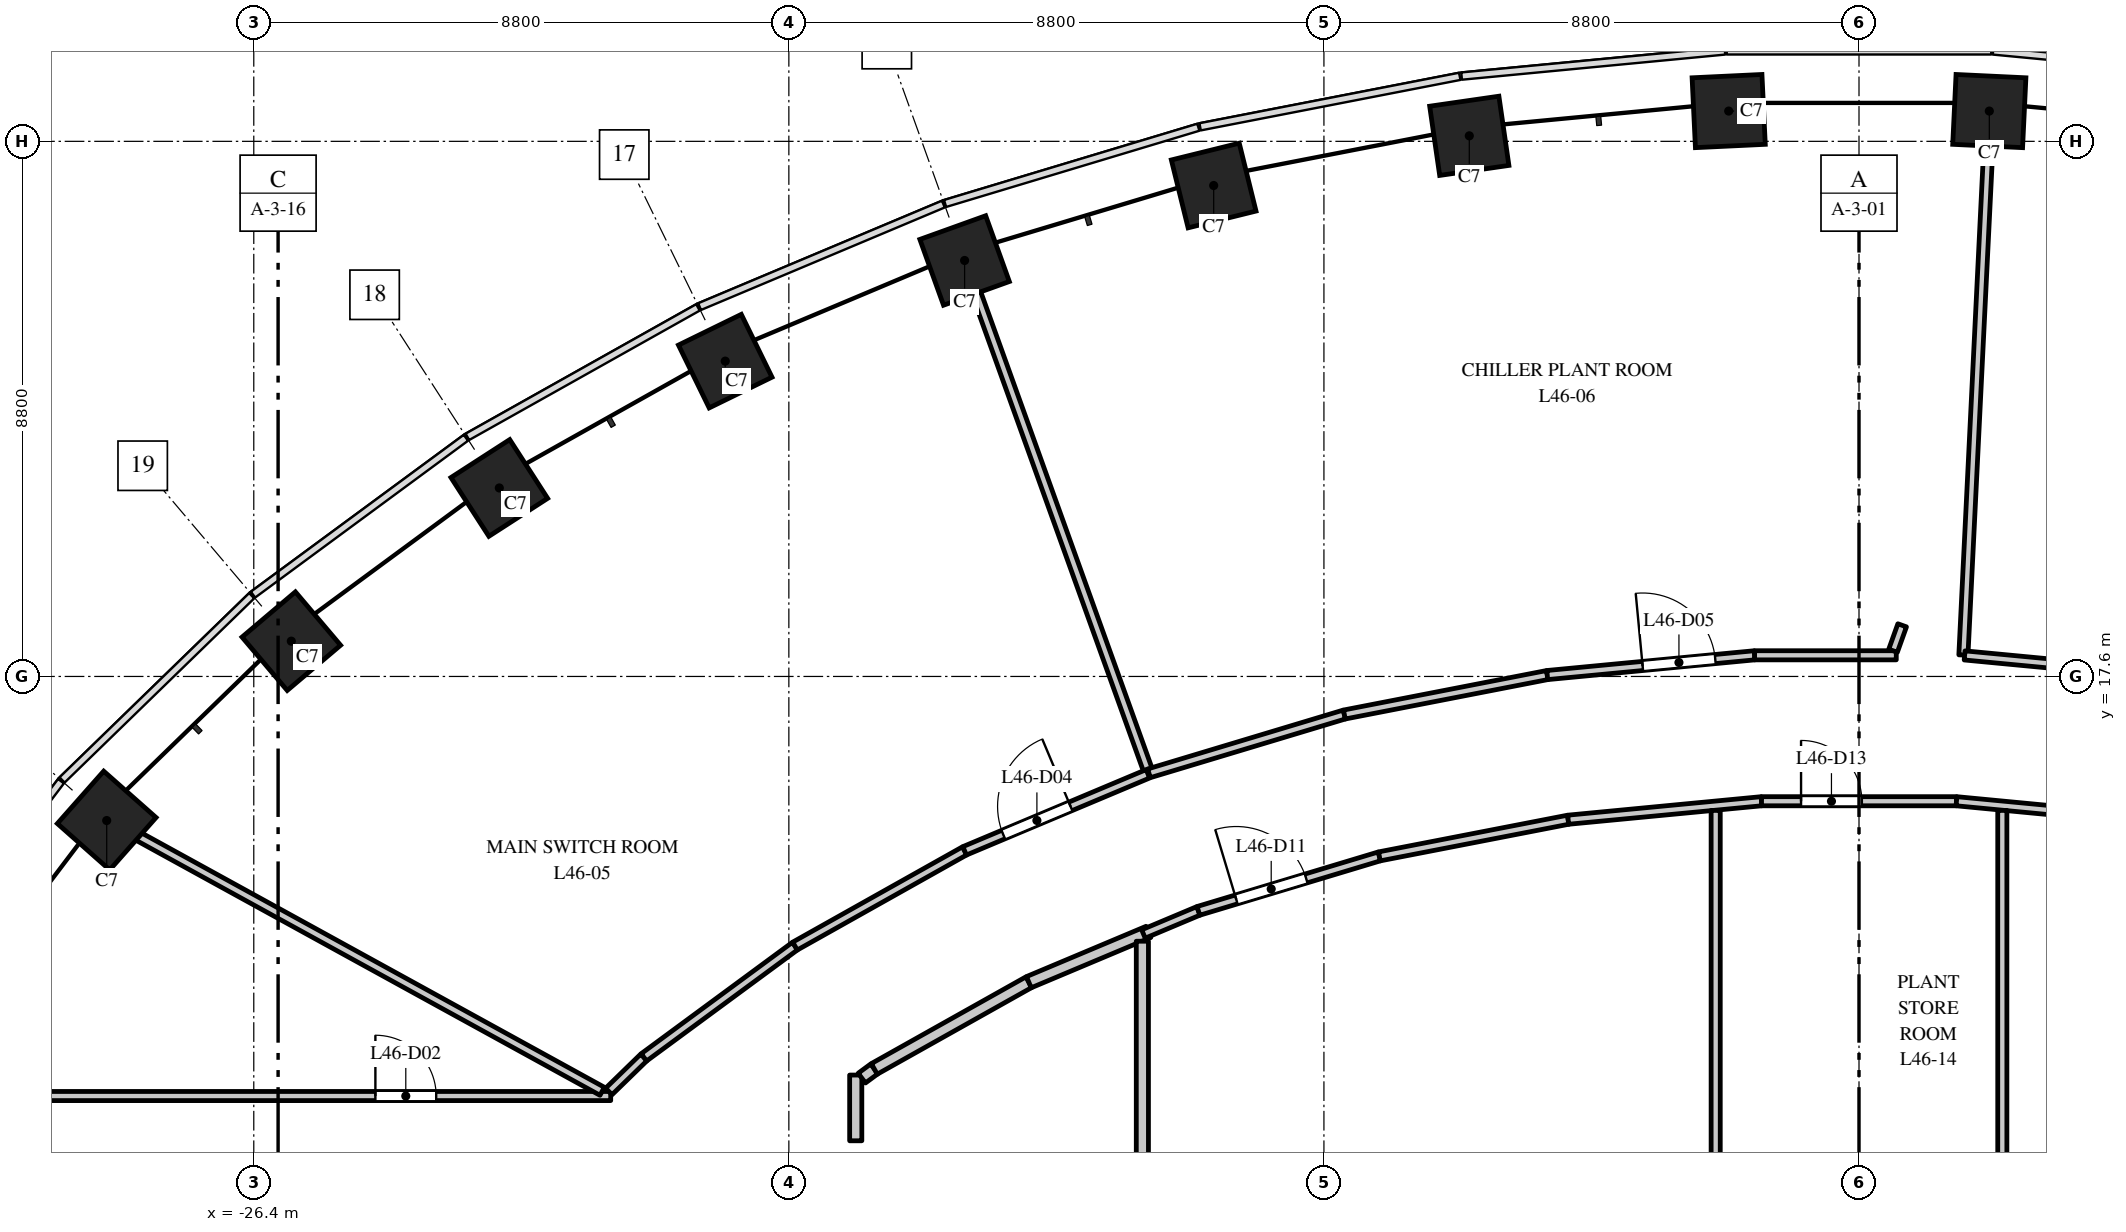
"""IFC4 building model, lengths in metres.
Left out: names, types, materials, properties, quantities, classifications, styles, units other than length and angle.
Written with IfcOpenShell. Run it as: python <this file> out.ifc"""

import sys

from ifc_helpers import new_model, si_unit, direction, frame, frame_2d, origin, origin_2d, place, context, subcontext, project, spatial, rectangle, extrude, element, fill, save


model = new_model("IFC4")
c1 = context("Model", 3, precision=1e-05, world=origin(), true_north=direction((0.0, 1.0)))
c2 = subcontext(c1, "Body", "Model", "MODEL_VIEW")
j1 = project(units=[si_unit("LENGTHUNIT", "METRE"), si_unit("PLANEANGLEUNIT", "RADIAN")], contexts=[c1])
p1 = place(None, origin())
s1 = spatial("IfcSite", under=j1, at=p1, CompositionType="ELEMENT")
p2 = place(p1, origin())
s2 = spatial("IfcBuilding", under=s1, at=p2, CompositionType="ELEMENT")
p3 = place(p2, frame((0.0, 0.0, 198.0)))
s3 = spatial("IfcBuildingStorey", under=s2, at=p3, CompositionType="ELEMENT", Elevation=198.0)
for number, where, z_axis, x_axis in (
    (1, (2.143, 26.898, 0.0), (0.0, 0.0, 1.0), (-0.999, 0.048, 0.0)),
    (2, (-2.143, 26.898, 0.0), (0.0, 0.0, 1.0), (-0.999, -0.048, 0.0)),
    (3, (-6.409, 26.491, 0.0), (0.0, 0.0, 1.0), (-0.99, -0.143, 0.0)),
    (4, (-10.613, 25.674, 0.0), (0.0, 0.0, 1.0), (-0.971, -0.24, 0.0)),
    (5, (-14.709, 24.441, 0.0), (0.0, 0.0, 1.0), (-0.941, -0.338, 0.0)),
    (6, (-18.646, 22.785, 0.0), (0.0, 0.0, 1.0), (-0.898, -0.439, 0.0)),
    (7, (-22.362, 20.7, 0.0), (0.0, 0.0, 1.0), (-0.84, -0.542, 0.0)),
    (8, (-25.783, 18.18, 0.0), (0.0, 0.0, 1.0), (-0.763, -0.646, 0.0)),
    (9, (-28.819, 15.23, 0.0), (0.0, 0.0, 1.0), (-0.663, -0.749, 0.0)),
):
    element("IfcColumn", number, at=place(p3, frame(where, z_axis=z_axis, x_axis=x_axis)), inside=s3, PredefinedType="COLUMN", context=c2, shape_type="SweptSolid", body=[
        extrude(rectangle(XDim=1.15, YDim=1.15, at=origin_2d()), origin(), (0.0, 0.0, 1.0), 5.5),
    ])
p4 = place(p3, frame((-30.397, 10.7, 0.0), z_axis=(0.0, 0.0, 1.0), x_axis=(1.0, 0.0, 0.0)))
e10 = element("IfcWall", 10, at=p4, inside=s3, PredefinedType="PARTITIONING", context=c2, shape_type="SweptSolid", body=[
    extrude(rectangle(XDim=9.867, YDim=0.15, at=frame_2d((4.934, 0.0))), origin(), (0.0, 0.0, 1.0), 4.35),
])
p5 = place(p4, frame((5.997, 0.0, 0.0)))
e11 = element("IfcOpeningElement", 11, at=p5, cuts=e10, PredefinedType="OPENING", context=c2, shape_type="SweptSolid", body=[
    extrude(rectangle(XDim=1.0, YDim=2.1, at=frame_2d((0.5, 1.05))), frame((0.0, 0.085, 0.0), z_axis=(0.0, -1.0, 0.0), x_axis=(1.0, 0.0, 0.0)), (0.0, 0.0, 1.0), 0.17),
])
p6 = place(p3, frame((-28.893, 15.297, 0.0), z_axis=(0.0, 0.0, 1.0), x_axis=(0.876381760949, -0.481617077227, 0.0)))
e12 = element("IfcWall", 12, at=p6, inside=s3, PredefinedType="PARTITIONING", context=c2, shape_type="SweptSolid", body=[
    extrude(rectangle(XDim=9.383, YDim=0.15, at=frame_2d((4.691, 0.0))), origin(), (0.0, 0.0, 1.0), 5.15),
])
p7 = place(p3, frame((-20.561, 10.775, 0.0), z_axis=(0.0, 0.0, 1.0), x_axis=(0.717045449997, 0.697026414591, 0.0)))
e13 = element("IfcWall", 13, at=p7, inside=s3, PredefinedType="PARTITIONING", context=c2, shape_type="SweptSolid", body=[
    extrude(rectangle(XDim=0.805, YDim=0.15, at=frame_2d((0.402, 0.0))), origin(), (0.0, 0.0, 1.0), 5.15),
])
p8 = place(p3, frame((-19.984, 11.336, 0.0), z_axis=(0.0, 0.0, 1.0), x_axis=(0.805191029373, 0.593015519373, 0.0)))
e14 = element("IfcWall", 14, at=p8, inside=s3, PredefinedType="PARTITIONING", context=c2, shape_type="SweptSolid", body=[
    extrude(rectangle(XDim=3.086, YDim=0.15, at=frame_2d((1.543, 0.0))), origin(), (0.0, 0.0, 1.0), 4.2),
])
p9 = place(p3, frame((-17.499, 13.166, 0.0), z_axis=(0.0, 0.0, 1.0), x_axis=(0.872039782413, 0.489434998635, 0.0)))
e15 = element("IfcWall", 15, at=p9, inside=s3, PredefinedType="PARTITIONING", context=c2, shape_type="SweptSolid", body=[
    extrude(rectangle(XDim=3.199, YDim=0.15, at=frame_2d((1.6, 0.0))), origin(), (0.0, 0.0, 1.0), 5.15),
])
p10 = place(p3, frame((-16.5, 9.964, 0.0), z_axis=(0.0, 0.0, 1.0), x_axis=(0.0, 1.0, 0.0)))
e16 = element("IfcWall", 16, at=p10, inside=s3, PredefinedType="PARTITIONING", context=c2, shape_type="SweptSolid", body=[
    extrude(rectangle(XDim=1.081, YDim=0.2, at=frame_2d((0.541, 0.0))), origin(), (0.0, 0.0, 1.0), 5.15),
])
p11 = place(p3, frame((-16.4, 10.995, 0.0), z_axis=(0.0, 0.0, 1.0), x_axis=(0.805152309286, 0.593068089558, 0.0)))
e17 = element("IfcWall", 17, at=p11, inside=s3, PredefinedType="PARTITIONING", context=c2, shape_type="SweptSolid", body=[
    extrude(rectangle(XDim=0.254, YDim=0.2, at=frame_2d((0.127, 0.0))), origin(), (0.0, 0.0, 1.0), 5.15),
])
p12 = place(p3, frame((-16.195, 11.146, 0.0), z_axis=(0.0, 0.0, 1.0), x_axis=(0.872138682379, 0.48925874412, 0.0)))
e18 = element("IfcWall", 18, at=p12, inside=s3, PredefinedType="PARTITIONING", context=c2, shape_type="SweptSolid", body=[
    extrude(rectangle(XDim=2.915, YDim=0.2, at=frame_2d((1.457, 0.0))), origin(), (0.0, 0.0, 1.0), 4.2),
])
p13 = place(p3, frame((-14.743, 24.535, 0.0), z_axis=(0.0, 0.0, 1.0), x_axis=(0.338360587152, -0.941016531769, 0.0)))
e19 = element("IfcWall", 19, at=p13, inside=s3, PredefinedType="PARTITIONING", context=c2, shape_type="SweptSolid", body=[
    extrude(rectangle(XDim=9.058, YDim=0.15, at=frame_2d((4.529, 0.0))), origin(), (0.0, 0.0, 1.0), 5.15),
])
p14 = place(p3, frame((-14.709, 14.732, 0.0), z_axis=(0.0, 0.0, 1.0), x_axis=(0.921846082319, 0.387556190137, 0.0)))
e20 = element("IfcWall", 20, at=p14, inside=s3, PredefinedType="PARTITIONING", context=c2, shape_type="SweptSolid", body=[
    extrude(rectangle(XDim=3.27, YDim=0.15, at=frame_2d((1.635, 0.0))), origin(), (0.0, 0.0, 1.0), 4.3),
])
p15 = place(p14, frame((0.689, 0.0, 0.0)))
e21 = element("IfcOpeningElement", 21, at=p15, cuts=e20, PredefinedType="OPENING", context=c2, shape_type="SweptSolid", body=[
    extrude(rectangle(XDim=1.2, YDim=2.1, at=frame_2d((0.6, 1.05))), frame((0.0, 0.085, 0.0), z_axis=(0.0, -1.0, 0.0), x_axis=(1.0, 0.0, 0.0)), (0.0, 0.0, 1.0), 0.17),
])
p16 = place(p3, frame((-13.653, 12.572, 0.0), z_axis=(0.0, 0.0, 1.0), x_axis=(0.921857058749, 0.387530080425, 0.0)))
e22 = element("IfcWall", 22, at=p16, inside=s3, PredefinedType="PARTITIONING", context=c2, shape_type="SweptSolid", body=[
    extrude(rectangle(XDim=2.134, YDim=0.2, at=frame_2d((1.067, 0.0))), origin(), (0.0, 0.0, 1.0), 5.15),
])
p17 = place(p3, frame((-11.786, -13.246, 0.0), z_axis=(0.0, 0.0, 1.0), x_axis=(0.0, 1.0, 0.0)))
e23 = element("IfcWall", 23, at=p17, inside=s3, PredefinedType="PARTITIONING", context=c2, shape_type="SweptSolid", body=[
    extrude(rectangle(XDim=26.492, YDim=0.2, at=frame_2d((13.246, 0.0))), origin(), (0.0, 0.0, 1.0), 4.2),
])
p18 = place(p3, frame((-11.768, 13.365, 0.0), z_axis=(0.0, 0.0, 1.0), x_axis=(0.921827385825, 0.387600658852, 0.0)))
e24 = element("IfcWall", 24, at=p18, inside=s3, PredefinedType="PARTITIONING", context=c2, shape_type="SweptSolid", body=[
    extrude(rectangle(XDim=0.981, YDim=0.15, at=frame_2d((0.49, 0.0))), origin(), (0.0, 0.0, 1.0), 4.3),
])
p19 = place(p3, frame((-11.677, 16.007, 0.0), z_axis=(0.0, 0.0, 1.0), x_axis=(0.957565546192, 0.28821558727, 0.0)))
e25 = element("IfcWall", 25, at=p19, inside=s3, PredefinedType="PARTITIONING", context=c2, shape_type="SweptSolid", body=[
    extrude(rectangle(XDim=3.355, YDim=0.15, at=frame_2d((1.678, 0.0))), origin(), (0.0, 0.0, 1.0), 5.15),
])
p20 = place(p3, frame((-10.864, 13.745, 0.0), z_axis=(0.0, 0.0, 1.0), x_axis=(0.957544770641, 0.28828460281, 0.0)))
e26 = element("IfcWall", 26, at=p20, inside=s3, PredefinedType="PARTITIONING", context=c2, shape_type="SweptSolid", body=[
    extrude(rectangle(XDim=3.108, YDim=0.15, at=frame_2d((1.554, 0.0))), origin(), (0.0, 0.0, 1.0), 5.15),
])
p21 = place(p20, frame((0.65, 0.0, 0.0)))
e27 = element("IfcOpeningElement", 27, at=p21, cuts=e26, PredefinedType="OPENING", context=c2, shape_type="SweptSolid", body=[
    extrude(rectangle(XDim=1.2, YDim=2.1, at=frame_2d((0.6, 1.05))), frame((0.0, 0.085, 0.0), z_axis=(0.0, -1.0, 0.0), x_axis=(1.0, 0.0, 0.0)), (0.0, 0.0, 1.0), 0.17),
])
p22 = place(p3, frame((-8.464, 16.974, 0.0), z_axis=(0.0, 0.0, 1.0), x_axis=(0.981613520879, 0.190879269771, 0.0)))
e28 = element("IfcWall", 28, at=p22, inside=s3, PredefinedType="PARTITIONING", context=c2, shape_type="SweptSolid", body=[
    extrude(rectangle(XDim=3.4, YDim=0.15, at=frame_2d((1.7, 0.0))), origin(), (0.0, 0.0, 1.0), 4.3),
])
p23 = place(p3, frame((-7.888, 14.641, 0.0), z_axis=(0.0, 0.0, 1.0), x_axis=(0.981672390077, 0.190576280162, 0.0)))
e29 = element("IfcWall", 29, at=p23, inside=s3, PredefinedType="PARTITIONING", context=c2, shape_type="SweptSolid", body=[
    extrude(rectangle(XDim=3.163, YDim=0.15, at=frame_2d((1.582, 0.0))), origin(), (0.0, 0.0, 1.0), 4.3),
])
p24 = place(p3, frame((-5.127, 17.623, 0.0), z_axis=(0.0, 0.0, 1.0), x_axis=(0.995490025265, 0.094866272186, 0.0)))
e30 = element("IfcWall", 30, at=p24, inside=s3, PredefinedType="PARTITIONING", context=c2, shape_type="SweptSolid", body=[
    extrude(rectangle(XDim=3.425, YDim=0.15, at=frame_2d((1.713, 0.0))), origin(), (0.0, 0.0, 1.0), 5.15),
])
p25 = place(p24, frame((1.575, 0.0, 0.0)))
e31 = element("IfcOpeningElement", 31, at=p25, cuts=e30, PredefinedType="OPENING", context=c2, shape_type="SweptSolid", body=[
    extrude(rectangle(XDim=1.2, YDim=2.1, at=frame_2d((0.6, 1.05))), frame((0.0, 0.085, 0.0), z_axis=(0.0, -1.0, 0.0), x_axis=(1.0, 0.0, 0.0)), (0.0, 0.0, 1.0), 0.17),
])
p26 = place(p3, frame((-4.783, 15.244, 0.0), z_axis=(0.0, 0.0, 1.0), x_axis=(0.995455539839, 0.095227455097, 0.0)))
e32 = element("IfcWall", 32, at=p26, inside=s3, PredefinedType="PARTITIONING", context=c2, shape_type="SweptSolid", body=[
    extrude(rectangle(XDim=3.194, YDim=0.15, at=frame_2d((1.597, 0.0))), origin(), (0.0, 0.0, 1.0), 5.15),
])
p27 = place(p3, frame((-2.357, 7.21, 0.0), z_axis=(0.0, 0.0, 1.0), x_axis=(0.0, 1.0, 0.0)))
e33 = element("IfcWall", 33, at=p27, inside=s3, PredefinedType="PARTITIONING", context=c2, shape_type="SweptSolid", body=[
    extrude(rectangle(XDim=8.187, YDim=0.15, at=frame_2d((4.094, 0.0))), origin(), (0.0, 0.0, 1.0), 4.35),
])
p28 = place(p3, frame((-1.717, 17.948, 0.0), z_axis=(0.0, 0.0, 1.0), x_axis=(1.0, 0.0, 0.0)))
e34 = element("IfcWall", 34, at=p28, inside=s3, PredefinedType="PARTITIONING", context=c2, shape_type="SweptSolid", body=[
    extrude(rectangle(XDim=2.33, YDim=0.15, at=frame_2d((1.165, 0.0))), origin(), (0.0, 0.0, 1.0), 4.3),
])
p29 = place(p3, frame((-1.603, 15.548, 0.0), z_axis=(0.0, 0.0, 1.0), x_axis=(1.0, 0.0, 0.0)))
e35 = element("IfcWall", 35, at=p29, inside=s3, PredefinedType="PARTITIONING", context=c2, shape_type="SweptSolid", body=[
    extrude(rectangle(XDim=3.206, YDim=0.15, at=frame_2d((1.603, 0.0))), origin(), (0.0, 0.0, 1.0), 4.3),
])
p30 = place(p29, frame((0.65, 0.0, 0.0)))
e36 = element("IfcOpeningElement", 36, at=p30, cuts=e35, PredefinedType="OPENING", context=c2, shape_type="SweptSolid", body=[
    extrude(rectangle(XDim=1.0, YDim=2.1, at=frame_2d((0.5, 1.05))), frame((0.0, 0.085, 0.0), z_axis=(0.0, -1.0, 0.0), x_axis=(1.0, 0.0, 0.0)), (0.0, 0.0, 1.0), 0.17),
])
p31 = place(p3, frame((0.56, 18.023, 0.0), z_axis=(0.0, 0.0, 1.0), x_axis=(0.337589988908, 0.941293258974, 0.0)))
e37 = element("IfcWall", 37, at=p31, inside=s3, PredefinedType="PARTITIONING", context=c2, shape_type="SweptSolid", body=[
    extrude(rectangle(XDim=0.444, YDim=0.15, at=frame_2d((0.222, 0.0))), origin(), (0.0, 0.0, 1.0), 5.15),
])
p32 = place(p3, frame((1.603, 15.548, 0.0), z_axis=(0.0, 0.0, 1.0), x_axis=(0.995455539839, -0.095227455097, 0.0)))
e38 = element("IfcWall", 38, at=p32, inside=s3, PredefinedType="PARTITIONING", context=c2, shape_type="SweptSolid", body=[
    extrude(rectangle(XDim=3.194, YDim=0.15, at=frame_2d((1.597, 0.0))), origin(), (0.0, 0.0, 1.0), 4.3),
])
p33 = place(p3, frame((1.717, 17.952, 0.0), z_axis=(0.0, 0.0, 1.0), x_axis=(0.049011179308, 0.998798230026, 0.0)))
e39 = element("IfcWall", 39, at=p33, inside=s3, PredefinedType="PARTITIONING", context=c2, shape_type="SweptSolid", body=[
    extrude(rectangle(XDim=9.056, YDim=0.15, at=frame_2d((4.528, 0.0))), origin(), (0.0, 0.0, 1.0), 5.15),
])
p34 = place(p3, frame((1.737, 17.946, 0.0), z_axis=(0.0, 0.0, 1.0), x_axis=(0.995491282675, -0.094853076484, 0.0)))
e40 = element("IfcWall", 40, at=p34, inside=s3, PredefinedType="PARTITIONING", context=c2, shape_type="SweptSolid", body=[
    extrude(rectangle(XDim=3.405, YDim=0.15, at=frame_2d((1.703, 0.0))), origin(), (0.0, 0.0, 1.0), 4.3),
])
p35 = place(p3, frame((2.357, 7.21, 0.0), z_axis=(0.0, 0.0, 1.0), x_axis=(0.0, 1.0, 0.0)))
e41 = element("IfcWall", 41, at=p35, inside=s3, PredefinedType="PARTITIONING", context=c2, shape_type="SweptSolid", body=[
    extrude(rectangle(XDim=8.187, YDim=0.15, at=frame_2d((4.094, 0.0))), origin(), (0.0, 0.0, 1.0), 4.3),
])
p36 = place(p5, origin())
e42 = element("IfcDoor", 42, at=p36, inside=s3, OperationType="SINGLE_SWING_LEFT", PredefinedType="DOOR", context=c2, shape_type="SweptSolid", body=[
    extrude(rectangle(XDim=1.0, YDim=2.1, at=frame_2d((0.5, 1.05))), frame((0.0, 0.025, 0.0), z_axis=(0.0, -1.0, 0.0), x_axis=(1.0, 0.0, 0.0)), (0.0, 0.0, 1.0), 0.05),
])
fill(e11, e42)
p37 = place(p15, origin())
e43 = element("IfcDoor", 43, at=p37, inside=s3, OperationType="SINGLE_SWING_RIGHT", PredefinedType="DOOR", context=c2, shape_type="SweptSolid", body=[
    extrude(rectangle(XDim=1.2, YDim=2.1, at=frame_2d((0.6, 1.05))), frame((0.0, 0.025, 0.0), z_axis=(0.0, -1.0, 0.0), x_axis=(1.0, 0.0, 0.0)), (0.0, 0.0, 1.0), 0.05),
])
fill(e21, e43)
p38 = place(p25, origin())
e44 = element("IfcDoor", 44, at=p38, inside=s3, OperationType="SINGLE_SWING_LEFT", PredefinedType="DOOR", context=c2, shape_type="SweptSolid", body=[
    extrude(rectangle(XDim=1.2, YDim=2.1, at=frame_2d((0.6, 1.05))), frame((0.0, 0.025, 0.0), z_axis=(0.0, -1.0, 0.0), x_axis=(1.0, 0.0, 0.0)), (0.0, 0.0, 1.0), 0.05),
])
fill(e31, e44)
p39 = place(p21, origin())
e45 = element("IfcDoor", 45, at=p39, inside=s3, OperationType="SINGLE_SWING_LEFT", PredefinedType="DOOR", context=c2, shape_type="SweptSolid", body=[
    extrude(rectangle(XDim=1.2, YDim=2.1, at=frame_2d((0.6, 1.05))), frame((0.0, 0.025, 0.0), z_axis=(0.0, -1.0, 0.0), x_axis=(1.0, 0.0, 0.0)), (0.0, 0.0, 1.0), 0.05),
])
fill(e27, e45)
p40 = place(p30, origin())
e46 = element("IfcDoor", 46, at=p40, inside=s3, OperationType="SINGLE_SWING_LEFT", PredefinedType="DOOR", context=c2, shape_type="SweptSolid", body=[
    extrude(rectangle(XDim=1.0, YDim=2.1, at=frame_2d((0.5, 1.05))), frame((0.0, 0.025, 0.0), z_axis=(0.0, -1.0, 0.0), x_axis=(1.0, 0.0, 0.0)), (0.0, 0.0, 1.0), 0.05),
])
fill(e36, e46)
save(model, sys.argv[1])
